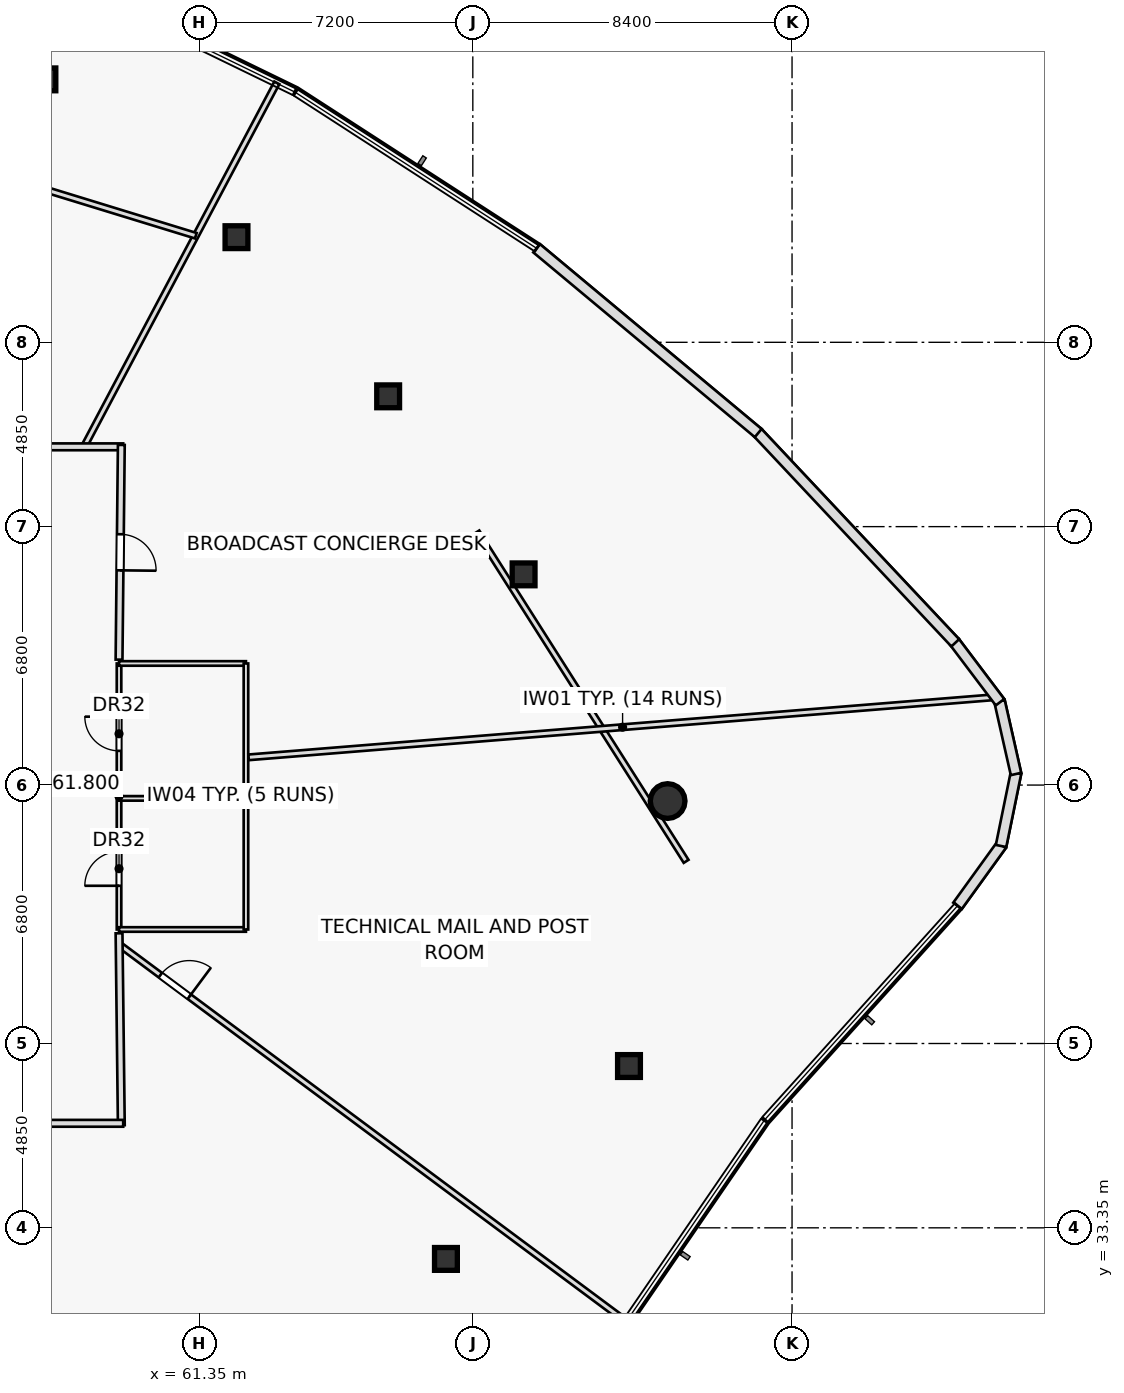
"""IFC4 building model, lengths in metres.
Left out: names, types, materials, properties, quantities, classifications, styles, units other than length and angle.
Written with IfcOpenShell. Run it as: python <this file> out.ifc"""

import sys

from ifc_helpers import new_model, si_unit, direction, frame, frame_2d, origin, origin_2d, place, context, subcontext, project, spatial, rectangle, hollow_rectangle, hollow_circle, extrude, element, fill, save


model = new_model("IFC4")
c1 = context("Model", 3, precision=1e-05, world=origin(), true_north=direction((0.0, 1.0)))
c2 = subcontext(c1, "Body", "Model", "MODEL_VIEW")
j1 = project(units=[si_unit("LENGTHUNIT", "METRE"), si_unit("PLANEANGLEUNIT", "RADIAN")], contexts=[c1])
p1 = place(None, origin())
s1 = spatial("IfcSite", under=j1, at=p1, CompositionType="ELEMENT")
p2 = place(p1, origin())
s2 = spatial("IfcBuilding", under=s1, at=p2, CompositionType="ELEMENT")
p3 = place(p2, frame((0.0, 0.0, 161.8)))
s3 = spatial("IfcBuildingStorey", under=s2, at=p3, CompositionType="ELEMENT", Elevation=161.8)
for number, where, z_axis, x_axis in (
    (1, (67.842, 32.532, 0.0), (0.0, 0.0, 1.0), (1.0, 0.0, 0.0)),
    (2, (72.659, 37.607, 0.0), (0.0, 0.0, 1.0), (1.0, 0.0, 0.0)),
):
    element("IfcColumn", number, at=place(p3, frame(where, z_axis=z_axis, x_axis=x_axis)), inside=s3, PredefinedType="COLUMN", context=c2, shape_type="SweptSolid", body=[
        extrude(hollow_rectangle(XDim=0.6, YDim=0.6, WallThickness=0.036, at=origin_2d()), origin(), (0.0, 0.0, 1.0), 3.55),
    ])
p4 = place(p3, frame((73.676, 44.58, 0.0), z_axis=(0.0, 0.0, 1.0), x_axis=(1.0, 0.0, 0.0)))
e3 = element("IfcColumn", 3, at=p4, inside=s3, PredefinedType="COLUMN", context=c2, shape_type="SweptSolid", body=[
    extrude(hollow_circle(Radius=0.457, WallThickness=0.04, at=origin_2d()), origin(), (0.0, 0.0, 1.0), 3.55),
])
for number, where, z_axis, x_axis in (
    (4, (69.886, 50.544, 0.0), (0.0, 0.0, 1.0), (1.0, 0.0, 0.0)),
    (5, (66.322, 55.229, 0.0), (0.0, 0.0, 1.0), (1.0, 0.0, 0.0)),
    (6, (62.331, 59.416, 0.0), (0.0, 0.0, 1.0), (1.0, 0.0, 0.0)),
    (7, (57.277, 63.568, 0.0), (0.0, 0.0, 1.0), (1.0, 0.0, 0.0)),
):
    element("IfcColumn", number, at=place(p3, frame(where, z_axis=z_axis, x_axis=x_axis)), inside=s3, PredefinedType="COLUMN", context=c2, shape_type="SweptSolid", body=[
        extrude(hollow_rectangle(XDim=0.6, YDim=0.6, WallThickness=0.036, at=origin_2d()), origin(), (0.0, 0.0, 1.0), 3.55),
    ])
p5 = place(p3, frame((74.163, 42.993, 0.0), z_axis=(0.0, 0.0, 1.0), x_axis=(-0.53628142437, 0.844039237166, 0.0)))
e8 = element("IfcWall", 8, at=p5, inside=s3, PredefinedType="PARTITIONING", context=c2, shape_type="SweptSolid", body=[
    extrude(rectangle(XDim=10.267, YDim=0.15, at=frame_2d((5.133, 0.0))), origin(), (0.0, 0.0, 1.0), 2.935),
])
p6 = place(p3, frame((59.24, 41.2, 0.0), z_axis=(0.0, 0.0, 1.0), x_axis=(0.0, 1.0, 0.0)))
e9 = element("IfcWall", 9, at=p6, inside=s3, PredefinedType="PARTITIONING", context=c2, shape_type="SweptSolid", body=[
    extrude(rectangle(XDim=7.0, YDim=0.12, at=frame_2d((3.5, 0.0))), origin(), (0.0, 0.0, 1.0), 3.55),
])
p7 = place(p6, frame((1.15, 0.0, 0.0)))
e10 = element("IfcOpeningElement", 10, at=p7, cuts=e9, PredefinedType="OPENING", context=c2, shape_type="SweptSolid", body=[
    extrude(rectangle(XDim=0.9, YDim=2.05, at=frame_2d((0.45, 1.025))), frame((0.0, 0.07, 0.0), z_axis=(0.0, -1.0, 0.0), x_axis=(1.0, 0.0, 0.0)), (0.0, 0.0, 1.0), 0.14),
])
p8 = place(p6, frame((4.7, 0.0, 0.0)))
e11 = element("IfcOpeningElement", 11, at=p8, cuts=e9, PredefinedType="OPENING", context=c2, shape_type="SweptSolid", body=[
    extrude(rectangle(XDim=0.9, YDim=2.05, at=frame_2d((0.45, 1.025))), frame((0.0, 0.07, 0.0), z_axis=(0.0, -1.0, 0.0), x_axis=(1.0, 0.0, 0.0)), (0.0, 0.0, 1.0), 0.14),
])
for number, where, z_axis, x_axis in (
    (12, (59.24, 41.2, 0.0), (0.0, 0.0, 1.0), (1.0, 0.0, 0.0)),
    (13, (59.24, 44.65, 0.0), (0.0, 0.0, 1.0), (1.0, 0.0, 0.0)),
    (14, (59.24, 48.2, 0.0), (0.0, 0.0, 1.0), (1.0, 0.0, 0.0)),
):
    element("IfcWall", number, at=place(p3, frame(where, z_axis=z_axis, x_axis=x_axis)), inside=s3, PredefinedType="PARTITIONING", context=c2, shape_type="SweptSolid", body=[
        extrude(rectangle(XDim=3.34, YDim=0.12, at=frame_2d((1.67, 0.0))), origin(), (0.0, 0.0, 1.0), 3.55),
    ])
p9 = place(p3, frame((62.58, 41.2, 0.0), z_axis=(0.0, 0.0, 1.0), x_axis=(0.0, 1.0, 0.0)))
e15 = element("IfcWall", 15, at=p9, inside=s3, PredefinedType="PARTITIONING", context=c2, shape_type="SweptSolid", body=[
    extrude(rectangle(XDim=7.0, YDim=0.12, at=frame_2d((3.5, 0.0))), origin(), (0.0, 0.0, 1.0), 3.55),
])
p10 = place(p3, frame((59.244, 40.804, 0.0), z_axis=(0.0, 0.0, 1.0), x_axis=(0.802525033697, -0.596618446152, 0.0)))
e16 = element("IfcWall", 16, at=p10, inside=s3, PredefinedType="PARTITIONING", context=c2, shape_type="SweptSolid", body=[
    extrude(rectangle(XDim=16.637, YDim=0.15, at=frame_2d((8.319, 0.0))), origin(), (0.0, 0.0, 1.0), 2.935),
])
p11 = place(p10, frame((1.35, 0.0, 0.0)))
e17 = element("IfcOpeningElement", 17, at=p11, cuts=e16, PredefinedType="OPENING", context=c2, shape_type="SweptSolid", body=[
    extrude(rectangle(XDim=0.95, YDim=2.05, at=frame_2d((0.475, 1.025))), frame((0.0, 0.085, 0.0), z_axis=(0.0, -1.0, 0.0), x_axis=(1.0, 0.0, 0.0)), (0.0, 0.0, 1.0), 0.17),
])
p12 = place(p3, frame((62.65, 45.729, 0.0), z_axis=(0.0, 0.0, 1.0), x_axis=(0.99676638327, 0.08035407384, 0.0)))
e18 = element("IfcWall", 18, at=p12, inside=s3, PredefinedType="PARTITIONING", context=c2, shape_type="SweptSolid", body=[
    extrude(rectangle(XDim=19.746, YDim=0.15, at=frame_2d((9.873, 0.0))), origin(), (0.0, 0.0, 1.0), 3.025),
])
p13 = place(p3, frame((58.317, 53.9, 0.0), z_axis=(0.0, 0.0, 1.0), x_axis=(0.468253014178, 0.883594428861, 0.0)))
e19 = element("IfcWall", 19, at=p13, inside=s3, PredefinedType="PARTITIONING", context=c2, shape_type="SweptSolid", body=[
    extrude(rectangle(XDim=10.839, YDim=0.15, at=frame_2d((5.419, 0.0))), origin(), (0.0, 0.0, 1.0), 2.935),
])
p14 = place(p3, frame((61.26, 59.455, 0.0), z_axis=(0.0, 0.0, 1.0), x_axis=(-0.956033107644, 0.293258754496, 0.0)))
e20 = element("IfcWall", 20, at=p14, inside=s3, PredefinedType="PARTITIONING", context=c2, shape_type="SweptSolid", body=[
    extrude(rectangle(XDim=12.758, YDim=0.15, at=frame_2d((6.379, 0.0))), origin(), (0.0, 0.0, 1.0), 2.935),
])
p15 = place(p14, frame((5.904, 0.0, 0.0)))
e21 = element("IfcOpeningElement", 21, at=p15, cuts=e20, PredefinedType="OPENING", context=c2, shape_type="SweptSolid", body=[
    extrude(rectangle(XDim=0.95, YDim=2.05, at=frame_2d((0.475, 1.025))), frame((0.0, 0.085, 0.0), z_axis=(0.0, -1.0, 0.0), x_axis=(1.0, 0.0, 0.0)), (0.0, 0.0, 1.0), 0.17),
])
p16 = place(p3, frame((54.3, 53.9, 0.0), z_axis=(0.0, 0.0, 1.0), x_axis=(1.0, 0.0, 0.0)))
e22 = element("IfcWall", 22, at=p16, inside=s3, PredefinedType="PARTITIONING", context=c2, shape_type="SweptSolid", body=[
    extrude(rectangle(XDim=5.05, YDim=0.18, at=frame_2d((2.525, 0.0))), origin(), (0.0, 0.0, 1.0), 2.935),
])
p17 = place(p16, frame((1.674, 0.0, 0.0)))
e23 = element("IfcOpeningElement", 23, at=p17, cuts=e22, PredefinedType="OPENING", context=c2, shape_type="SweptSolid", body=[
    extrude(rectangle(XDim=0.95, YDim=2.05, at=frame_2d((0.475, 1.025))), frame((0.0, 0.1, 0.0), z_axis=(0.0, -1.0, 0.0), x_axis=(1.0, 0.0, 0.0)), (0.0, 0.0, 1.0), 0.2),
])
p18 = place(p3, frame((59.301, 53.95, 0.0), z_axis=(0.0, 0.0, 1.0), x_axis=(-0.010629422803, -0.99994350609, 0.0)))
e24 = element("IfcWall", 24, at=p18, inside=s3, PredefinedType="PARTITIONING", context=c2, shape_type="SweptSolid", body=[
    extrude(rectangle(XDim=5.65, YDim=0.18, at=frame_2d((2.825, 0.0))), origin(), (0.0, 0.0, 1.0), 2.935),
])
p19 = place(p18, frame((2.35, 0.0, 0.0)))
e25 = element("IfcOpeningElement", 25, at=p19, cuts=e24, PredefinedType="OPENING", context=c2, shape_type="SweptSolid", body=[
    extrude(rectangle(XDim=0.95, YDim=2.05, at=frame_2d((0.475, 1.025))), frame((0.0, 0.1, 0.0), z_axis=(0.0, -1.0, 0.0), x_axis=(1.0, 0.0, 0.0)), (0.0, 0.0, 1.0), 0.2),
])
p20 = place(p3, frame((59.24, 41.1, 0.0), z_axis=(0.0, 0.0, 1.0), x_axis=(0.011891834917, -0.999929289631, 0.0)))
e26 = element("IfcWall", 26, at=p20, inside=s3, PredefinedType="PARTITIONING", context=c2, shape_type="SweptSolid", body=[
    extrude(rectangle(XDim=5.05, YDim=0.18, at=frame_2d((2.525, 0.0))), origin(), (0.0, 0.0, 1.0), 2.935),
])
p21 = place(p3, frame((59.35, 36.1, 0.0), z_axis=(0.0, 0.0, 1.0), x_axis=(-1.0, 0.0, 0.0)))
e27 = element("IfcWall", 27, at=p21, inside=s3, PredefinedType="PARTITIONING", context=c2, shape_type="SweptSolid", body=[
    extrude(rectangle(XDim=19.6, YDim=0.18, at=frame_2d((9.8, 0.0))), origin(), (0.0, 0.0, 1.0), 2.935),
])
p22 = place(p21, frame((2.923, 0.0, 0.0)))
e28 = element("IfcOpeningElement", 28, at=p22, cuts=e27, PredefinedType="OPENING", context=c2, shape_type="SweptSolid", body=[
    extrude(rectangle(XDim=0.95, YDim=2.05, at=frame_2d((0.475, 1.025))), frame((0.0, 0.1, 0.0), z_axis=(0.0, -1.0, 0.0), x_axis=(1.0, 0.0, 0.0)), (0.0, 0.0, 1.0), 0.2),
])
p23 = place(p21, frame((12.488, 0.0, 0.0)))
e29 = element("IfcOpeningElement", 29, at=p23, cuts=e27, PredefinedType="OPENING", context=c2, shape_type="SweptSolid", body=[
    extrude(rectangle(XDim=0.95, YDim=2.05, at=frame_2d((0.475, 1.025))), frame((0.0, 0.1, 0.0), z_axis=(0.0, -1.0, 0.0), x_axis=(1.0, 0.0, 0.0)), (0.0, 0.0, 1.0), 0.2),
])
p24 = place(p3, frame((81.305, 41.823, 0.0), z_axis=(0.0, 0.0, 1.0), x_axis=(0.585765811542, 0.810480360051, 0.0)))
e30 = element("IfcWall", 30, at=p24, inside=s3, PredefinedType="STANDARD", context=c2, shape_type="SweptSolid", body=[
    extrude(rectangle(XDim=1.975, YDim=0.28, at=frame_2d((0.988, 0.0))), origin(), (0.0, 0.0, 1.0), 3.55),
])
p25 = place(p3, frame((82.45, 43.397, 0.0), z_axis=(0.0, 0.0, 1.0), x_axis=(0.200322996015, 0.979729910367, 0.0)))
e31 = element("IfcWall", 31, at=p25, inside=s3, PredefinedType="STANDARD", context=c2, shape_type="SweptSolid", body=[
    extrude(rectangle(XDim=1.963, YDim=0.28, at=frame_2d((0.982, 0.0))), origin(), (0.0, 0.0, 1.0), 3.55),
])
p26 = place(p3, frame((82.843, 45.292, 0.0), z_axis=(0.0, 0.0, 1.0), x_axis=(-0.220680608885, 0.975346127722, 0.0)))
e32 = element("IfcWall", 32, at=p26, inside=s3, PredefinedType="STANDARD", context=c2, shape_type="SweptSolid", body=[
    extrude(rectangle(XDim=1.964, YDim=0.28, at=frame_2d((0.982, 0.0))), origin(), (0.0, 0.0, 1.0), 3.55),
])
p27 = place(p3, frame((82.422, 47.18, 0.0), z_axis=(0.0, 0.0, 1.0), x_axis=(-0.602455667752, 0.798152346606, 0.0)))
e33 = element("IfcWall", 33, at=p27, inside=s3, PredefinedType="STANDARD", context=c2, shape_type="SweptSolid", body=[
    extrude(rectangle(XDim=1.986, YDim=0.28, at=frame_2d((0.993, 0.0))), origin(), (0.0, 0.0, 1.0), 3.55),
])
p28 = place(p3, frame((81.245, 48.742, 0.0), z_axis=(0.0, 0.0, 1.0), x_axis=(-0.684851704524, 0.728682470497, 0.0)))
e34 = element("IfcWall", 34, at=p28, inside=s3, PredefinedType="STANDARD", context=c2, shape_type="SweptSolid", body=[
    extrude(rectangle(XDim=7.603, YDim=0.28, at=frame_2d((3.802, 0.0))), origin(), (0.0, 0.0, 1.0), 3.55),
])
p29 = place(p3, frame((76.06, 54.262, 0.0), z_axis=(0.0, 0.0, 1.0), x_axis=(-0.767999798656, 0.640450083351, 0.0)))
e35 = element("IfcWall", 35, at=p29, inside=s3, PredefinedType="STANDARD", context=c2, shape_type="SweptSolid", body=[
    extrude(rectangle(XDim=7.591, YDim=0.28, at=frame_2d((3.796, 0.0))), origin(), (0.0, 0.0, 1.0), 3.55),
])
p30 = place(p7, origin())
e36 = element("IfcDoor", 36, at=p30, inside=s3, OperationType="SINGLE_SWING_LEFT", PredefinedType="DOOR", context=c2, shape_type="SweptSolid", body=[
    extrude(rectangle(XDim=0.9, YDim=2.05, at=frame_2d((0.45, 1.025))), frame((0.0, 0.025, 0.0), z_axis=(0.0, -1.0, 0.0), x_axis=(1.0, 0.0, 0.0)), (0.0, 0.0, 1.0), 0.05),
])
fill(e10, e36)
p31 = place(p8, origin())
e37 = element("IfcDoor", 37, at=p31, inside=s3, OperationType="SINGLE_SWING_RIGHT", PredefinedType="DOOR", context=c2, shape_type="SweptSolid", body=[
    extrude(rectangle(XDim=0.9, YDim=2.05, at=frame_2d((0.45, 1.025))), frame((0.0, 0.025, 0.0), z_axis=(0.0, -1.0, 0.0), x_axis=(1.0, 0.0, 0.0)), (0.0, 0.0, 1.0), 0.05),
])
fill(e11, e37)
p32 = place(p11, origin())
e38 = element("IfcDoor", 38, at=p32, inside=s3, OperationType="SINGLE_SWING_RIGHT", PredefinedType="DOOR", context=c2, shape_type="SweptSolid", body=[
    extrude(rectangle(XDim=0.95, YDim=2.05, at=frame_2d((0.475, 1.025))), frame((0.0, 0.025, 0.0), z_axis=(0.0, -1.0, 0.0), x_axis=(1.0, 0.0, 0.0)), (0.0, 0.0, 1.0), 0.05),
])
fill(e17, e38)
p33 = place(p19, origin())
e39 = element("IfcDoor", 39, at=p33, inside=s3, OperationType="SINGLE_SWING_RIGHT", PredefinedType="DOOR", context=c2, shape_type="SweptSolid", body=[
    extrude(rectangle(XDim=0.95, YDim=2.05, at=frame_2d((0.475, 1.025))), frame((0.0, 0.025, 0.0), z_axis=(0.0, -1.0, 0.0), x_axis=(1.0, 0.0, 0.0)), (0.0, 0.0, 1.0), 0.05),
])
fill(e25, e39)
save(model, sys.argv[1])
